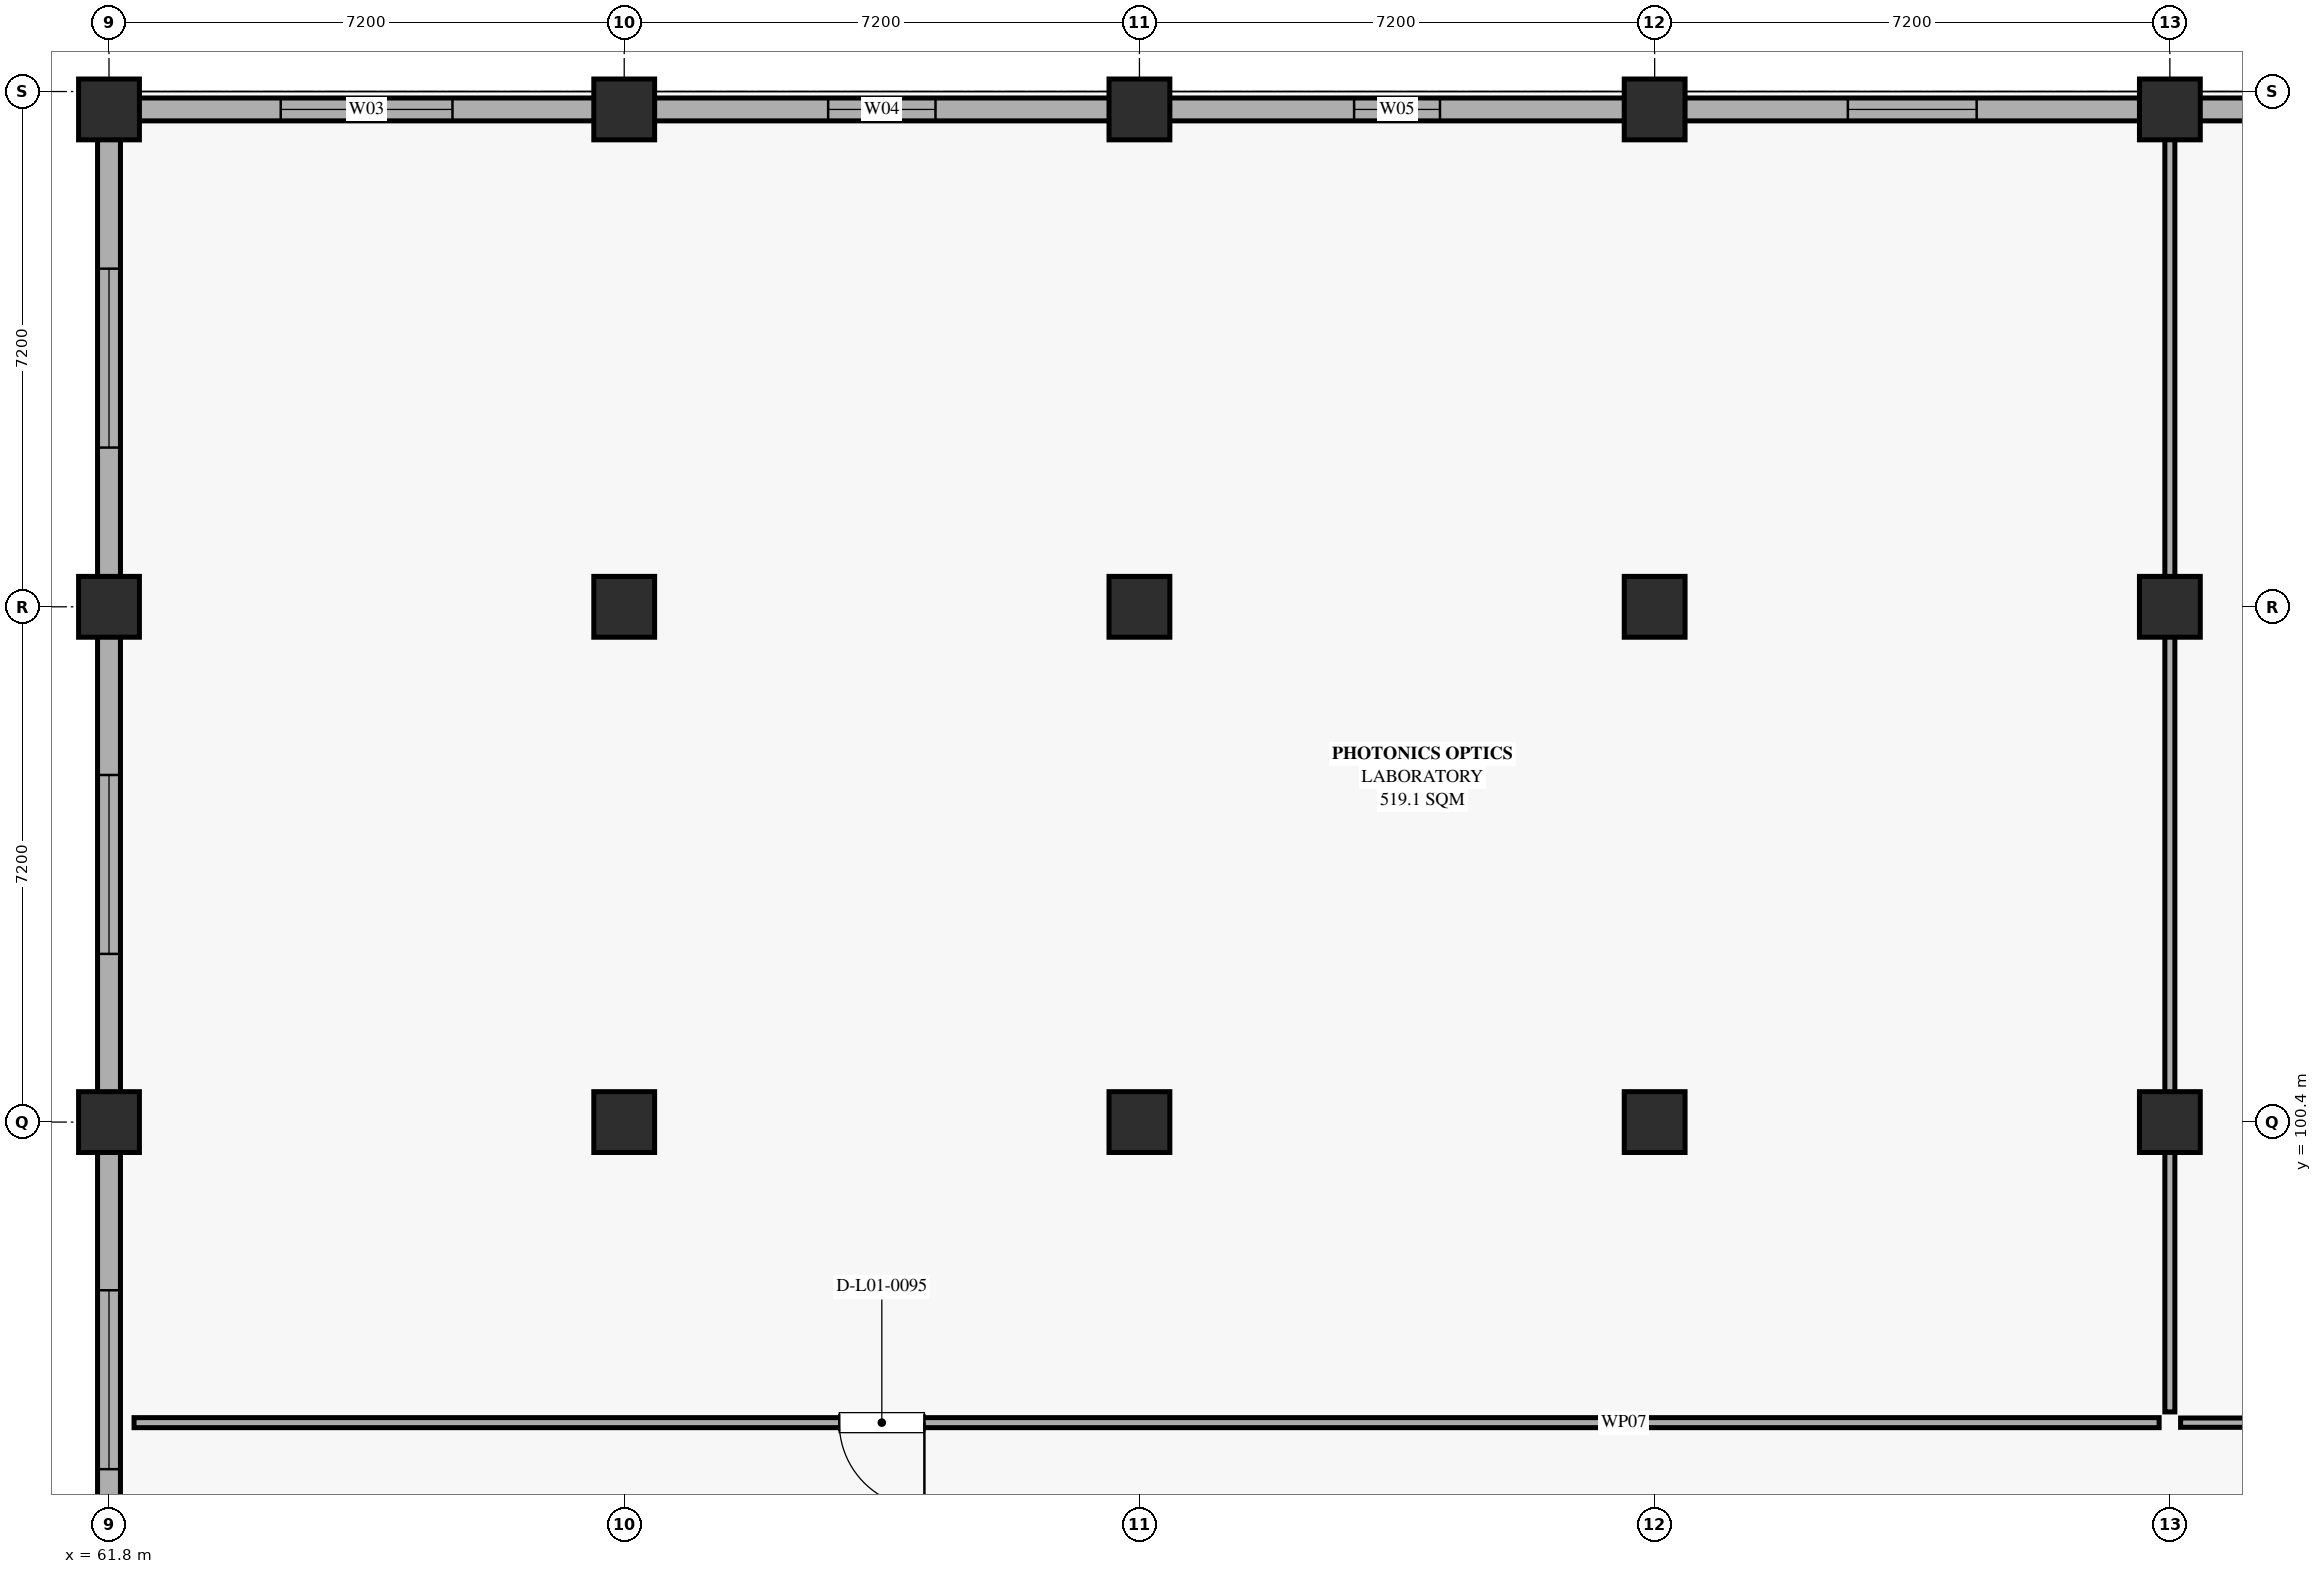
"""IFC4 building model, lengths in metres.
Left out: names, types, materials, properties, quantities, classifications, styles, units other than length and angle.
Written with IfcOpenShell. Run it as: python <this file> out.ifc"""

import sys

from ifc_helpers import new_model, si_unit, direction, frame, frame_2d, origin, origin_2d, place, context, subcontext, project, spatial, rectangle, extrude, element, fill, save


model = new_model("IFC4")
c1 = context("Model", 3, precision=1e-05, world=origin(), true_north=direction((0.0, 1.0)))
c2 = subcontext(c1, "Body", "Model", "MODEL_VIEW")
j1 = project(units=[si_unit("LENGTHUNIT", "METRE"), si_unit("PLANEANGLEUNIT", "RADIAN")], contexts=[c1])
p1 = place(None, origin())
s1 = spatial("IfcSite", under=j1, at=p1, CompositionType="ELEMENT")
p2 = place(p1, origin())
s2 = spatial("IfcBuilding", under=s1, at=p2, CompositionType="ELEMENT")
p3 = place(p2, frame((0.0, 0.0, 5.4)))
s3 = spatial("IfcBuildingStorey", under=s2, at=p3, CompositionType="ELEMENT", Elevation=5.4)
for number, where, z_axis, x_axis in (
    (1, (61.8, 100.4, 0.0), (0.0, 0.0, 1.0), (1.0, 0.0, 0.0)),
    (2, (69.0, 100.4, 0.0), (0.0, 0.0, 1.0), (1.0, 0.0, 0.0)),
    (3, (76.2, 100.4, 0.0), (0.0, 0.0, 1.0), (1.0, 0.0, 0.0)),
    (4, (83.4, 100.4, 0.0), (0.0, 0.0, 1.0), (1.0, 0.0, 0.0)),
    (5, (90.6, 100.4, 0.0), (0.0, 0.0, 1.0), (1.0, 0.0, 0.0)),
    (6, (61.8, 107.6, 0.0), (0.0, 0.0, 1.0), (1.0, 0.0, 0.0)),
    (7, (69.0, 107.6, 0.0), (0.0, 0.0, 1.0), (1.0, 0.0, 0.0)),
    (8, (76.2, 107.6, 0.0), (0.0, 0.0, 1.0), (1.0, 0.0, 0.0)),
    (9, (83.4, 107.6, 0.0), (0.0, 0.0, 1.0), (1.0, 0.0, 0.0)),
    (10, (90.6, 107.6, 0.0), (0.0, 0.0, 1.0), (1.0, 0.0, 0.0)),
    (11, (61.8, 114.55, 0.0), (0.0, 0.0, 1.0), (1.0, 0.0, 0.0)),
    (12, (69.0, 114.55, 0.0), (0.0, 0.0, 1.0), (1.0, 0.0, 0.0)),
    (13, (76.2, 114.55, 0.0), (0.0, 0.0, 1.0), (1.0, 0.0, 0.0)),
    (14, (83.4, 114.55, 0.0), (0.0, 0.0, 1.0), (1.0, 0.0, 0.0)),
    (15, (90.6, 114.55, 0.0), (0.0, 0.0, 1.0), (1.0, 0.0, 0.0)),
):
    element("IfcColumn", number, at=place(p3, frame(where, z_axis=z_axis, x_axis=x_axis)), inside=s3, PredefinedType="COLUMN", context=c2, shape_type="SweptSolid", body=[
        extrude(rectangle(XDim=0.85, YDim=0.85, at=origin_2d()), origin(), (0.0, 0.0, 1.0), 5.04),
    ])
p4 = place(p3, frame((61.8, 93.61, 0.0), z_axis=(0.0, 0.0, 1.0), x_axis=(0.0, 1.0, 0.0)))
e16 = element("IfcWall", 16, at=p4, inside=s3, PredefinedType="SOLIDWALL", context=c2, shape_type="SweptSolid", body=[
    extrude(rectangle(XDim=6.38, YDim=0.32, at=frame_2d((3.19, 0.0))), origin(), (0.0, 0.0, 1.0), 3.54),
])
p5 = place(p4, frame((1.94, 0.0, 0.9)))
e17 = element("IfcOpeningElement", 17, at=p5, cuts=e16, PredefinedType="OPENING", context=c2, shape_type="SweptSolid", body=[
    extrude(rectangle(XDim=2.5, YDim=2.2, at=frame_2d((1.25, 1.1))), frame((0.0, 0.17, 0.0), z_axis=(0.0, -1.0, 0.0), x_axis=(1.0, 0.0, 0.0)), (0.0, 0.0, 1.0), 0.34),
])
p6 = place(p3, frame((61.8, 100.81, 0.0), z_axis=(0.0, 0.0, 1.0), x_axis=(0.0, 1.0, 0.0)))
e18 = element("IfcWall", 18, at=p6, inside=s3, PredefinedType="SOLIDWALL", context=c2, shape_type="SweptSolid", body=[
    extrude(rectangle(XDim=6.38, YDim=0.32, at=frame_2d((3.19, 0.0))), origin(), (0.0, 0.0, 1.0), 3.54),
])
p7 = place(p6, frame((1.94, 0.0, 0.9)))
e19 = element("IfcOpeningElement", 19, at=p7, cuts=e18, PredefinedType="OPENING", context=c2, shape_type="SweptSolid", body=[
    extrude(rectangle(XDim=2.5, YDim=2.2, at=frame_2d((1.25, 1.1))), frame((0.0, 0.17, 0.0), z_axis=(0.0, -1.0, 0.0), x_axis=(1.0, 0.0, 0.0)), (0.0, 0.0, 1.0), 0.34),
])
p8 = place(p3, frame((61.8, 108.01, 0.0), z_axis=(0.0, 0.0, 1.0), x_axis=(0.0, 1.0, 0.0)))
e20 = element("IfcWall", 20, at=p8, inside=s3, PredefinedType="SOLIDWALL", context=c2, shape_type="SweptSolid", body=[
    extrude(rectangle(XDim=6.13, YDim=0.32, at=frame_2d((3.065, 0.0))), origin(), (0.0, 0.0, 1.0), 3.54),
])
p9 = place(p8, frame((1.815, 0.0, 0.9)))
e21 = element("IfcOpeningElement", 21, at=p9, cuts=e20, PredefinedType="OPENING", context=c2, shape_type="SweptSolid", body=[
    extrude(rectangle(XDim=2.5, YDim=2.2, at=frame_2d((1.25, 1.1))), frame((0.0, 0.17, 0.0), z_axis=(0.0, -1.0, 0.0), x_axis=(1.0, 0.0, 0.0)), (0.0, 0.0, 1.0), 0.34),
])
p10 = place(p3, frame((62.21, 114.55, 0.0), z_axis=(0.0, 0.0, 1.0), x_axis=(1.0, 0.0, 0.0)))
e22 = element("IfcWall", 22, at=p10, inside=s3, PredefinedType="SOLIDWALL", context=c2, shape_type="SweptSolid", body=[
    extrude(rectangle(XDim=6.38, YDim=0.32, at=frame_2d((3.19, 0.0))), origin(), (0.0, 0.0, 1.0), 3.54),
])
p11 = place(p10, frame((1.99, 0.0, 0.9)))
e23 = element("IfcOpeningElement", 23, at=p11, cuts=e22, PredefinedType="OPENING", context=c2, shape_type="SweptSolid", body=[
    extrude(rectangle(XDim=2.4, YDim=2.4, at=frame_2d((1.2, 1.2))), frame((0.0, 0.17, 0.0), z_axis=(0.0, -1.0, 0.0), x_axis=(1.0, 0.0, 0.0)), (0.0, 0.0, 1.0), 0.34),
])
p12 = place(p3, frame((69.41, 114.55, 0.0), z_axis=(0.0, 0.0, 1.0), x_axis=(1.0, 0.0, 0.0)))
e24 = element("IfcWall", 24, at=p12, inside=s3, PredefinedType="SOLIDWALL", context=c2, shape_type="SweptSolid", body=[
    extrude(rectangle(XDim=6.38, YDim=0.32, at=frame_2d((3.19, 0.0))), origin(), (0.0, 0.0, 1.0), 3.54),
])
p13 = place(p12, frame((2.44, 0.0, 0.9)))
e25 = element("IfcOpeningElement", 25, at=p13, cuts=e24, PredefinedType="OPENING", context=c2, shape_type="SweptSolid", body=[
    extrude(rectangle(XDim=1.5, YDim=2.4, at=frame_2d((0.75, 1.2))), frame((0.0, 0.17, 0.0), z_axis=(0.0, -1.0, 0.0), x_axis=(1.0, 0.0, 0.0)), (0.0, 0.0, 1.0), 0.34),
])
p14 = place(p3, frame((76.61, 114.55, 0.0), z_axis=(0.0, 0.0, 1.0), x_axis=(1.0, 0.0, 0.0)))
e26 = element("IfcWall", 26, at=p14, inside=s3, PredefinedType="SOLIDWALL", context=c2, shape_type="SweptSolid", body=[
    extrude(rectangle(XDim=6.38, YDim=0.32, at=frame_2d((3.19, 0.0))), origin(), (0.0, 0.0, 1.0), 3.54),
])
p15 = place(p14, frame((2.59, 0.0, 0.9)))
e27 = element("IfcOpeningElement", 27, at=p15, cuts=e26, PredefinedType="OPENING", context=c2, shape_type="SweptSolid", body=[
    extrude(rectangle(XDim=1.2, YDim=2.4, at=frame_2d((0.6, 1.2))), frame((0.0, 0.17, 0.0), z_axis=(0.0, -1.0, 0.0), x_axis=(1.0, 0.0, 0.0)), (0.0, 0.0, 1.0), 0.34),
])
p16 = place(p3, frame((83.81, 114.55, 0.0), z_axis=(0.0, 0.0, 1.0), x_axis=(1.0, 0.0, 0.0)))
e28 = element("IfcWall", 28, at=p16, inside=s3, PredefinedType="SOLIDWALL", context=c2, shape_type="SweptSolid", body=[
    extrude(rectangle(XDim=6.38, YDim=0.32, at=frame_2d((3.19, 0.0))), origin(), (0.0, 0.0, 1.0), 3.54),
])
p17 = place(p16, frame((2.29, 0.0, 0.9)))
e29 = element("IfcOpeningElement", 29, at=p17, cuts=e28, PredefinedType="OPENING", context=c2, shape_type="SweptSolid", body=[
    extrude(rectangle(XDim=1.8, YDim=2.1, at=frame_2d((0.9, 1.05))), frame((0.0, 0.17, 0.0), z_axis=(0.0, -1.0, 0.0), x_axis=(1.0, 0.0, 0.0)), (0.0, 0.0, 1.0), 0.34),
])
p18 = place(p3, frame((91.01, 114.55, 0.0), z_axis=(0.0, 0.0, 1.0), x_axis=(1.0, 0.0, 0.0)))
e30 = element("IfcWall", 30, at=p18, inside=s3, PredefinedType="SOLIDWALL", context=c2, shape_type="SweptSolid", body=[
    extrude(rectangle(XDim=6.38, YDim=0.32, at=frame_2d((3.19, 0.0))), origin(), (0.0, 0.0, 1.0), 3.54),
])
p19 = place(p18, frame((2.14, 0.0, 0.9)))
e31 = element("IfcOpeningElement", 31, at=p19, cuts=e30, PredefinedType="OPENING", context=c2, shape_type="SweptSolid", body=[
    extrude(rectangle(XDim=2.1, YDim=2.1, at=frame_2d((1.05, 1.05))), frame((0.0, 0.17, 0.0), z_axis=(0.0, -1.0, 0.0), x_axis=(1.0, 0.0, 0.0)), (0.0, 0.0, 1.0), 0.34),
])
p20 = place(p3, frame((90.45, 96.2, 0.0), z_axis=(0.0, 0.0, 1.0), x_axis=(-1.0, 0.0, 0.0)))
e32 = element("IfcWall", 32, at=p20, inside=s3, PredefinedType="PARTITIONING", context=c2, shape_type="SweptSolid", body=[
    extrude(rectangle(XDim=28.3, YDim=0.14, at=frame_2d((14.15, 0.0))), origin(), (0.0, 0.0, 1.0), 3.52),
])
p21 = place(p20, frame((17.255, 0.0, 0.0)))
e33 = element("IfcOpeningElement", 33, at=p21, cuts=e32, PredefinedType="OPENING", context=c2, shape_type="SweptSolid", body=[
    extrude(rectangle(XDim=1.19, YDim=2.22, at=frame_2d((0.595, 1.11))), frame((0.0, 0.08, 0.0), z_axis=(0.0, -1.0, 0.0), x_axis=(1.0, 0.0, 0.0)), (0.0, 0.0, 1.0), 0.16),
])
p22 = place(p3, frame((90.6, 114.2, 0.0), z_axis=(0.0, 0.0, 1.0), x_axis=(0.0, -1.0, 0.0)))
e34 = element("IfcWall", 34, at=p22, inside=s3, PredefinedType="PARTITIONING", context=c2, shape_type="SweptSolid", body=[
    extrude(rectangle(XDim=17.85, YDim=0.14, at=frame_2d((8.925, 0.0))), origin(), (0.0, 0.0, 1.0), 3.52),
])
p23 = place(p3, frame((111.85, 96.2, 0.0), z_axis=(0.0, 0.0, 1.0), x_axis=(-1.0, 0.0, 0.0)))
e35 = element("IfcWall", 35, at=p23, inside=s3, PredefinedType="PARTITIONING", context=c2, shape_type="SweptSolid", body=[
    extrude(rectangle(XDim=21.1, YDim=0.13, at=frame_2d((10.55, 0.0))), origin(), (0.0, 0.0, 1.0), 3.52),
])
p24 = place(p23, frame((9.835, 0.0, 0.0)))
e36 = element("IfcOpeningElement", 36, at=p24, cuts=e35, PredefinedType="OPENING", context=c2, shape_type="SweptSolid", body=[
    extrude(rectangle(XDim=1.23, YDim=2.05, at=frame_2d((0.615, 1.025))), frame((0.0, 0.075, 0.0), z_axis=(0.0, -1.0, 0.0), x_axis=(1.0, 0.0, 0.0)), (0.0, 0.0, 1.0), 0.15),
])
p25 = place(p5, origin())
e37 = element("IfcWindow", 37, at=p25, inside=s3, PartitioningType="DOUBLE_PANEL_VERTICAL", PredefinedType="WINDOW", context=c2, shape_type="SweptSolid", body=[
    extrude(rectangle(XDim=2.5, YDim=2.2, at=frame_2d((1.25, 1.1))), frame((0.0, 0.03, 0.0), z_axis=(0.0, -1.0, 0.0), x_axis=(1.0, 0.0, 0.0)), (0.0, 0.0, 1.0), 0.06),
])
fill(e17, e37)
p26 = place(p7, origin())
e38 = element("IfcWindow", 38, at=p26, inside=s3, PartitioningType="DOUBLE_PANEL_VERTICAL", PredefinedType="WINDOW", context=c2, shape_type="SweptSolid", body=[
    extrude(rectangle(XDim=2.5, YDim=2.2, at=frame_2d((1.25, 1.1))), frame((0.0, 0.03, 0.0), z_axis=(0.0, -1.0, 0.0), x_axis=(1.0, 0.0, 0.0)), (0.0, 0.0, 1.0), 0.06),
])
fill(e19, e38)
p27 = place(p9, origin())
e39 = element("IfcWindow", 39, at=p27, inside=s3, PartitioningType="DOUBLE_PANEL_VERTICAL", PredefinedType="WINDOW", context=c2, shape_type="SweptSolid", body=[
    extrude(rectangle(XDim=2.5, YDim=2.2, at=frame_2d((1.25, 1.1))), frame((0.0, 0.03, 0.0), z_axis=(0.0, -1.0, 0.0), x_axis=(1.0, 0.0, 0.0)), (0.0, 0.0, 1.0), 0.06),
])
fill(e21, e39)
p28 = place(p11, origin())
e40 = element("IfcWindow", 40, at=p28, inside=s3, PartitioningType="DOUBLE_PANEL_VERTICAL", PredefinedType="WINDOW", context=c2, shape_type="SweptSolid", body=[
    extrude(rectangle(XDim=2.4, YDim=2.4, at=frame_2d((1.2, 1.2))), frame((0.0, 0.03, 0.0), z_axis=(0.0, -1.0, 0.0), x_axis=(1.0, 0.0, 0.0)), (0.0, 0.0, 1.0), 0.06),
])
fill(e23, e40)
p29 = place(p13, origin())
e41 = element("IfcWindow", 41, at=p29, inside=s3, PartitioningType="SINGLE_PANEL", PredefinedType="WINDOW", context=c2, shape_type="SweptSolid", body=[
    extrude(rectangle(XDim=1.5, YDim=2.4, at=frame_2d((0.75, 1.2))), frame((0.0, 0.03, 0.0), z_axis=(0.0, -1.0, 0.0), x_axis=(1.0, 0.0, 0.0)), (0.0, 0.0, 1.0), 0.06),
])
fill(e25, e41)
p30 = place(p15, origin())
e42 = element("IfcWindow", 42, at=p30, inside=s3, PartitioningType="SINGLE_PANEL", PredefinedType="WINDOW", context=c2, shape_type="SweptSolid", body=[
    extrude(rectangle(XDim=1.2, YDim=2.4, at=frame_2d((0.6, 1.2))), frame((0.0, 0.03, 0.0), z_axis=(0.0, -1.0, 0.0), x_axis=(1.0, 0.0, 0.0)), (0.0, 0.0, 1.0), 0.06),
])
fill(e27, e42)
p31 = place(p17, origin())
e43 = element("IfcWindow", 43, at=p31, inside=s3, PartitioningType="DOUBLE_PANEL_VERTICAL", PredefinedType="WINDOW", context=c2, shape_type="SweptSolid", body=[
    extrude(rectangle(XDim=1.8, YDim=2.1, at=frame_2d((0.9, 1.05))), frame((0.0, 0.03, 0.0), z_axis=(0.0, -1.0, 0.0), x_axis=(1.0, 0.0, 0.0)), (0.0, 0.0, 1.0), 0.06),
])
fill(e29, e43)
p32 = place(p21, origin())
e44 = element("IfcDoor", 44, at=p32, inside=s3, OperationType="SINGLE_SWING_LEFT", PredefinedType="DOOR", context=c2, shape_type="SweptSolid", body=[
    extrude(rectangle(XDim=1.19, YDim=2.22, at=frame_2d((0.595, 1.11))), frame((0.0, 0.025, 0.0), z_axis=(0.0, -1.0, 0.0), x_axis=(1.0, 0.0, 0.0)), (0.0, 0.0, 1.0), 0.05),
])
fill(e33, e44)
save(model, sys.argv[1])
